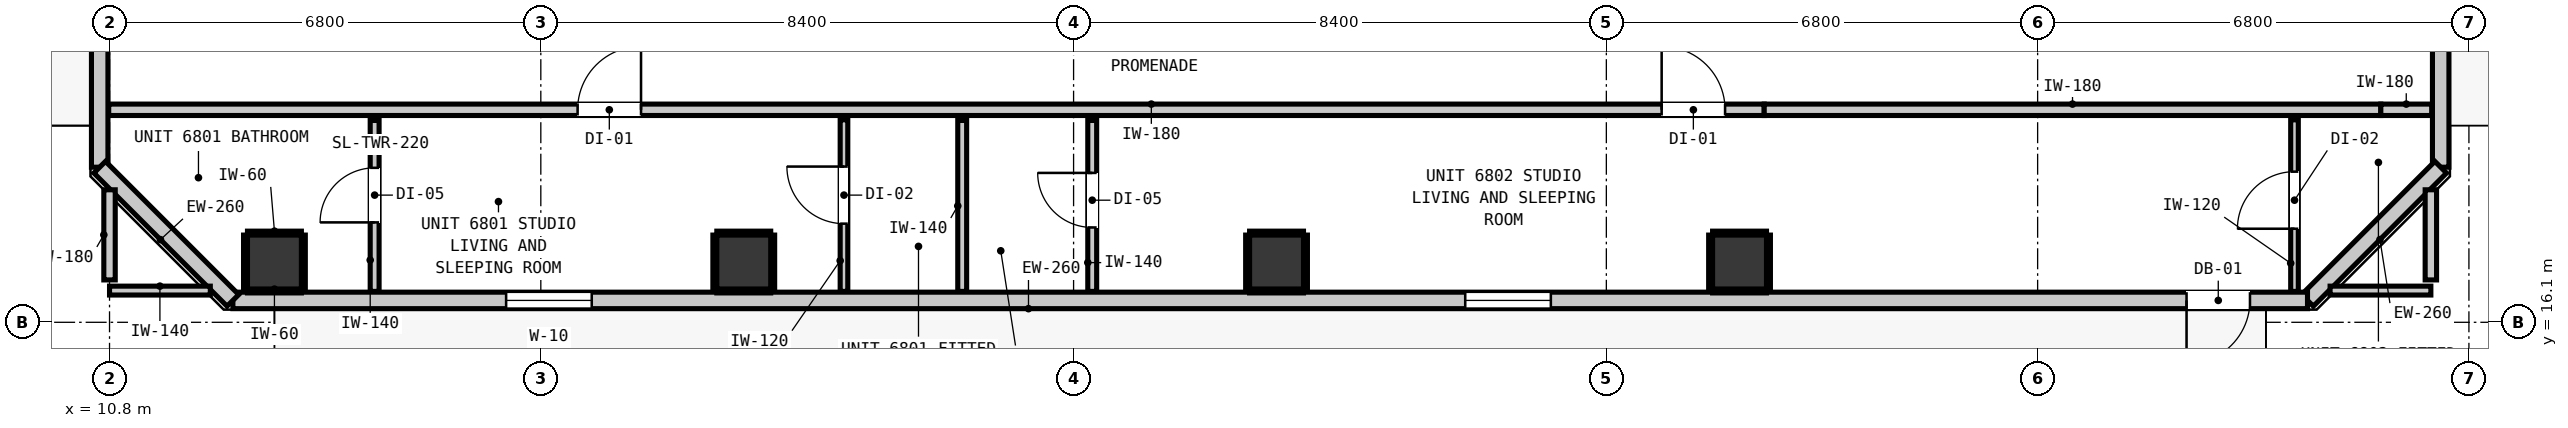
"""IFC4 building model, lengths in metres.
Left out: names, types, materials, properties, quantities, classifications, styles, units other than length and angle.
Written with IfcOpenShell. Run it as: python <this file> out.ifc"""

import sys

from ifc_helpers import new_model, si_unit, direction, frame, frame_2d, origin, origin_2d, place, context, subcontext, project, spatial, rectangle, extrude, element, fill, save


model = new_model("IFC4")
c1 = context("Model", 3, precision=1e-05, world=origin(), true_north=direction((0.0, 1.0)))
c2 = subcontext(c1, "Body", "Model", "MODEL_VIEW")
j1 = project(units=[si_unit("LENGTHUNIT", "METRE"), si_unit("PLANEANGLEUNIT", "RADIAN")], contexts=[c1])
p1 = place(None, origin())
s1 = spatial("IfcSite", under=j1, at=p1, CompositionType="ELEMENT")
p2 = place(p1, origin())
s2 = spatial("IfcBuilding", under=s1, at=p2, CompositionType="ELEMENT")
p3 = place(p2, frame((0.0, 0.0, 234.6)))
s3 = spatial("IfcBuildingStorey", under=s2, at=p3, CompositionType="ELEMENT", Elevation=234.6)
for number, where, z_axis, x_axis in (
    (1, (13.4, 17.05, 0.0), (0.0, 0.0, 1.0), (1.0, 0.0, 0.0)),
    (2, (20.8, 17.05, 0.0), (0.0, 0.0, 1.0), (1.0, 0.0, 0.0)),
    (3, (29.2, 17.05, 0.0), (0.0, 0.0, 1.0), (1.0, 0.0, 0.0)),
    (4, (36.5, 17.05, 0.0), (0.0, 0.0, 1.0), (1.0, 0.0, 0.0)),
):
    element("IfcColumn", number, at=place(p3, frame(where, z_axis=z_axis, x_axis=x_axis)), inside=s3, PredefinedType="COLUMN", context=c2, shape_type="SweptSolid", body=[
        extrude(rectangle(XDim=0.85, YDim=0.85, at=origin_2d()), origin(), (0.0, 0.0, 1.0), 3.32),
    ])
p4 = place(p3, frame((10.645, 18.545, 0.0), z_axis=(0.0, 0.0, 1.0), x_axis=(0.0, 1.0, 0.0)))
e5 = element("IfcWall", 5, at=p4, inside=s3, PredefinedType="STANDARD", context=c2, shape_type="SweptSolid", body=[
    extrude(rectangle(XDim=30.31, YDim=0.26, at=frame_2d((15.155, 0.0))), origin(), (0.0, 0.0, 1.0), 3.1),
])
p5 = place(p4, frame((27.695, 0.0, 0.0)))
e6 = element("IfcOpeningElement", 6, at=p5, cuts=e5, PredefinedType="OPENING", context=c2, shape_type="SweptSolid", body=[
    extrude(rectangle(XDim=1.0, YDim=2.15, at=frame_2d((0.5, 1.075))), frame((0.0, 0.14, 0.0), z_axis=(0.0, -1.0, 0.0), x_axis=(1.0, 0.0, 0.0)), (0.0, 0.0, 1.0), 0.28),
])
p6 = place(p4, frame((29.108, 0.0, 0.85)))
e7 = element("IfcOpeningElement", 7, at=p6, cuts=e5, PredefinedType="OPENING", context=c2, shape_type="SweptSolid", body=[
    extrude(rectangle(XDim=0.9, YDim=1.5, at=frame_2d((0.45, 0.75))), frame((0.0, 0.14, 0.0), z_axis=(0.0, -1.0, 0.0), x_axis=(1.0, 0.0, 0.0)), (0.0, 0.0, 1.0), 0.28),
])
p7 = place(p3, frame((47.555, 48.855, 0.0), z_axis=(0.0, 0.0, 1.0), x_axis=(0.0, -1.0, 0.0)))
e8 = element("IfcWall", 8, at=p7, inside=s3, PredefinedType="STANDARD", context=c2, shape_type="SweptSolid", body=[
    extrude(rectangle(XDim=30.31, YDim=0.26, at=frame_2d((15.155, 0.0))), origin(), (0.0, 0.0, 1.0), 3.1),
])
p8 = place(p7, frame((0.91, 0.0, 0.0)))
e9 = element("IfcOpeningElement", 9, at=p8, cuts=e8, PredefinedType="OPENING", context=c2, shape_type="SweptSolid", body=[
    extrude(rectangle(XDim=1.0, YDim=2.15, at=frame_2d((0.5, 1.075))), frame((0.0, 0.14, 0.0), z_axis=(0.0, -1.0, 0.0), x_axis=(1.0, 0.0, 0.0)), (0.0, 0.0, 1.0), 0.28),
])
p9 = place(p7, frame((3.782, 0.0, 0.85)))
e10 = element("IfcOpeningElement", 10, at=p9, cuts=e8, PredefinedType="OPENING", context=c2, shape_type="SweptSolid", body=[
    extrude(rectangle(XDim=1.35, YDim=1.85, at=frame_2d((0.675, 0.925))), frame((0.0, 0.14, 0.0), z_axis=(0.0, -1.0, 0.0), x_axis=(1.0, 0.0, 0.0)), (0.0, 0.0, 1.0), 0.28),
])
p10 = place(p3, frame((47.555, 18.545, 0.0), z_axis=(0.0, 0.0, 1.0), x_axis=(-0.707106781187, -0.707106781187, 0.0)))
e11 = element("IfcWall", 11, at=p10, inside=s3, PredefinedType="STANDARD", context=c2, shape_type="SweptSolid", body=[
    extrude(rectangle(XDim=2.97, YDim=0.26, at=frame_2d((1.485, 0.0))), origin(), (0.0, 0.0, 1.0), 3.1),
])
p11 = place(p3, frame((45.455, 16.445, 0.0), z_axis=(0.0, 0.0, 1.0), x_axis=(-1.0, 0.0, 0.0)))
e12 = element("IfcWall", 12, at=p11, inside=s3, PredefinedType="STANDARD", context=c2, shape_type="SweptSolid", body=[
    extrude(rectangle(XDim=32.71, YDim=0.26, at=frame_2d((16.355, 0.0))), origin(), (0.0, 0.0, 1.0), 3.1),
])
p12 = place(p11, frame((0.907, 0.0, 0.0)))
e13 = element("IfcOpeningElement", 13, at=p12, cuts=e12, PredefinedType="OPENING", context=c2, shape_type="SweptSolid", body=[
    extrude(rectangle(XDim=1.0, YDim=2.15, at=frame_2d((0.5, 1.075))), frame((0.0, 0.14, 0.0), z_axis=(0.0, -1.0, 0.0), x_axis=(1.0, 0.0, 0.0)), (0.0, 0.0, 1.0), 0.28),
])
p13 = place(p11, frame((27.052, 0.0, 0.85)))
e14 = element("IfcOpeningElement", 14, at=p13, cuts=e12, PredefinedType="OPENING", context=c2, shape_type="SweptSolid", body=[
    extrude(rectangle(XDim=1.35, YDim=1.85, at=frame_2d((0.675, 0.925))), frame((0.0, 0.14, 0.0), z_axis=(0.0, -1.0, 0.0), x_axis=(1.0, 0.0, 0.0)), (0.0, 0.0, 1.0), 0.28),
])
p14 = place(p11, frame((11.93, 0.0, 0.85)))
e15 = element("IfcOpeningElement", 15, at=p14, cuts=e12, PredefinedType="OPENING", context=c2, shape_type="SweptSolid", body=[
    extrude(rectangle(XDim=1.35, YDim=1.85, at=frame_2d((0.675, 0.925))), frame((0.0, 0.14, 0.0), z_axis=(0.0, -1.0, 0.0), x_axis=(1.0, 0.0, 0.0)), (0.0, 0.0, 1.0), 0.28),
])
p15 = place(p3, frame((12.745, 16.445, 0.0), z_axis=(0.0, 0.0, 1.0), x_axis=(-0.707147883682, 0.707065676302, 0.0)))
e16 = element("IfcWall", 16, at=p15, inside=s3, PredefinedType="STANDARD", context=c2, shape_type="SweptSolid", body=[
    extrude(rectangle(XDim=2.97, YDim=0.26, at=frame_2d((1.485, 0.0))), origin(), (0.0, 0.0, 1.0), 3.1),
])
p16 = place(p3, frame((10.787, 19.45, 0.0), z_axis=(0.0, 0.0, 1.0), x_axis=(1.0, 0.0, 0.0)))
e17 = element("IfcWall", 17, at=p16, inside=s3, PredefinedType="PARTITIONING", context=c2, shape_type="SweptSolid", body=[
    extrude(rectangle(XDim=26.102, YDim=0.18, at=frame_2d((13.051, 0.0))), origin(), (0.0, 0.0, 1.0), 3.1),
])
p17 = place(p16, frame((7.393, 0.0, 0.0)))
e18 = element("IfcOpeningElement", 18, at=p17, cuts=e17, PredefinedType="OPENING", context=c2, shape_type="SweptSolid", body=[
    extrude(rectangle(XDim=1.0, YDim=2.15, at=frame_2d((0.5, 1.075))), frame((0.0, 0.1, 0.0), z_axis=(0.0, -1.0, 0.0), x_axis=(1.0, 0.0, 0.0)), (0.0, 0.0, 1.0), 0.2),
])
p18 = place(p16, frame((24.485, 0.0, 0.0)))
e19 = element("IfcOpeningElement", 19, at=p18, cuts=e17, PredefinedType="OPENING", context=c2, shape_type="SweptSolid", body=[
    extrude(rectangle(XDim=1.0, YDim=2.15, at=frame_2d((0.5, 1.075))), frame((0.0, 0.1, 0.0), z_axis=(0.0, -1.0, 0.0), x_axis=(1.0, 0.0, 0.0)), (0.0, 0.0, 1.0), 0.2),
])
p19 = place(p3, frame((36.889, 19.45, 0.0), z_axis=(0.0, 0.0, 1.0), x_axis=(1.0, 0.0, 0.0)))
e20 = element("IfcWall", 20, at=p19, inside=s3, PredefinedType="PARTITIONING", context=c2, shape_type="SweptSolid", body=[
    extrude(rectangle(XDim=9.722, YDim=0.18, at=frame_2d((4.861, 0.0))), origin(), (0.0, 0.0, 1.0), 2.477),
])
p20 = place(p3, frame((46.611, 19.45, 0.0), z_axis=(0.0, 0.0, 1.0), x_axis=(1.0, 0.0, 0.0)))
e21 = element("IfcWall", 21, at=p20, inside=s3, PredefinedType="PARTITIONING", context=c2, shape_type="SweptSolid", body=[
    extrude(rectangle(XDim=0.802, YDim=0.18, at=frame_2d((0.401, 0.0))), origin(), (0.0, 0.0, 1.0), 3.1),
])
for number, where, z_axis, x_axis in (
    (22, (10.8, 16.6, 0.0), (0.0, 0.0, 1.0), (1.0, 0.0, 0.0)),
    (23, (45.811, 16.6, 0.0), (0.0, 0.0, 1.0), (1.0, 0.0, 0.0)),
):
    element("IfcWall", number, at=place(p3, frame(where, z_axis=z_axis, x_axis=x_axis)), inside=s3, PredefinedType="PARTITIONING", context=c2, shape_type="SweptSolid", body=[
        extrude(rectangle(XDim=1.589, YDim=0.14, at=frame_2d((0.794, 0.0))), origin(), (0.0, 0.0, 1.0), 3.1),
    ])
for number, where, z_axis, x_axis in (
    (24, (10.8, 16.768, 0.0), (0.0, 0.0, 1.0), (0.0, 1.0, 0.0)),
    (25, (47.4, 16.768, 0.0), (0.0, 0.0, 1.0), (0.0, 1.0, 0.0)),
):
    element("IfcWall", number, at=place(p3, frame(where, z_axis=z_axis, x_axis=x_axis)), inside=s3, PredefinedType="PARTITIONING", context=c2, shape_type="SweptSolid", body=[
        extrude(rectangle(XDim=1.421, YDim=0.18, at=frame_2d((0.71, 0.0))), origin(), (0.0, 0.0, 1.0), 3.1),
    ])
p21 = place(p3, frame((14.98, 16.587, 0.0), z_axis=(0.0, 0.0, 1.0), x_axis=(0.0, 1.0, 0.0)))
e26 = element("IfcWall", 26, at=p21, inside=s3, PredefinedType="PARTITIONING", context=c2, shape_type="SweptSolid", body=[
    extrude(rectangle(XDim=2.695, YDim=0.14, at=frame_2d((1.348, 0.0))), origin(), (0.0, 0.0, 1.0), 3.1),
])
p22 = place(p21, frame((1.088, 0.0, 0.0)))
e27 = element("IfcOpeningElement", 27, at=p22, cuts=e26, PredefinedType="OPENING", context=c2, shape_type="SweptSolid", body=[
    extrude(rectangle(XDim=0.86, YDim=2.02, at=frame_2d((0.43, 1.01))), frame((0.0, 0.08, 0.0), z_axis=(0.0, -1.0, 0.0), x_axis=(1.0, 0.0, 0.0)), (0.0, 0.0, 1.0), 0.16),
])
p23 = place(p3, frame((24.244, 16.587, 0.0), z_axis=(0.0, 0.0, 1.0), x_axis=(0.0, 1.0, 0.0)))
e28 = element("IfcWall", 28, at=p23, inside=s3, PredefinedType="PARTITIONING", context=c2, shape_type="SweptSolid", body=[
    extrude(rectangle(XDim=2.695, YDim=0.14, at=frame_2d((1.348, 0.0))), origin(), (0.0, 0.0, 1.0), 3.1),
])
p24 = place(p3, frame((26.294, 16.587, 0.0), z_axis=(0.0, 0.0, 1.0), x_axis=(0.0, 1.0, 0.0)))
e29 = element("IfcWall", 29, at=p24, inside=s3, PredefinedType="PARTITIONING", context=c2, shape_type="SweptSolid", body=[
    extrude(rectangle(XDim=2.695, YDim=0.14, at=frame_2d((1.348, 0.0))), origin(), (0.0, 0.0, 1.0), 3.1),
])
p25 = place(p24, frame((1.008, 0.0, 0.0)))
e30 = element("IfcOpeningElement", 30, at=p25, cuts=e29, PredefinedType="OPENING", context=c2, shape_type="SweptSolid", body=[
    extrude(rectangle(XDim=0.86, YDim=2.02, at=frame_2d((0.43, 1.01))), frame((0.0, 0.08, 0.0), z_axis=(0.0, -1.0, 0.0), x_axis=(1.0, 0.0, 0.0)), (0.0, 0.0, 1.0), 0.16),
])
p26 = place(p3, frame((22.38, 16.587, 0.0), z_axis=(0.0, 0.0, 1.0), x_axis=(0.0, 1.0, 0.0)))
e31 = element("IfcWall", 31, at=p26, inside=s3, PredefinedType="PARTITIONING", context=c2, shape_type="SweptSolid", body=[
    extrude(rectangle(XDim=2.705, YDim=0.12, at=frame_2d((1.353, 0.0))), origin(), (0.0, 0.0, 1.0), 3.1),
])
p27 = place(p26, frame((1.068, 0.0, 0.0)))
e32 = element("IfcOpeningElement", 32, at=p27, cuts=e31, PredefinedType="OPENING", context=c2, shape_type="SweptSolid", body=[
    extrude(rectangle(XDim=0.9, YDim=2.1, at=frame_2d((0.45, 1.05))), frame((0.0, 0.07, 0.0), z_axis=(0.0, -1.0, 0.0), x_axis=(1.0, 0.0, 0.0)), (0.0, 0.0, 1.0), 0.14),
])
p28 = place(p3, frame((45.25, 16.587, 0.0), z_axis=(0.0, 0.0, 1.0), x_axis=(0.0, 1.0, 0.0)))
e33 = element("IfcWall", 33, at=p28, inside=s3, PredefinedType="PARTITIONING", context=c2, shape_type="SweptSolid", body=[
    extrude(rectangle(XDim=2.705, YDim=0.12, at=frame_2d((1.353, 0.0))), origin(), (0.0, 0.0, 1.0), 3.1),
])
p29 = place(p28, frame((0.988, 0.0, 0.0)))
e34 = element("IfcOpeningElement", 34, at=p29, cuts=e33, PredefinedType="OPENING", context=c2, shape_type="SweptSolid", body=[
    extrude(rectangle(XDim=0.9, YDim=2.1, at=frame_2d((0.45, 1.05))), frame((0.0, 0.07, 0.0), z_axis=(0.0, -1.0, 0.0), x_axis=(1.0, 0.0, 0.0)), (0.0, 0.0, 1.0), 0.14),
])
for number, where, z_axis, x_axis in (
    (35, (12.975, 16.593, 0.0), (0.0, 0.0, 1.0), (1.0, 0.0, 0.0)),
    (36, (12.975, 17.507, 0.0), (0.0, 0.0, 1.0), (1.0, 0.0, 0.0)),
):
    element("IfcWall", number, at=place(p3, frame(where, z_axis=z_axis, x_axis=x_axis)), inside=s3, PredefinedType="PARTITIONING", context=c2, shape_type="SweptSolid", body=[
        extrude(rectangle(XDim=0.85, YDim=0.06, at=frame_2d((0.425, 0.0))), origin(), (0.0, 0.0, 1.0), 1.45),
    ])
for number, where, z_axis, x_axis in (
    (37, (12.943, 16.625, 0.0), (0.0, 0.0, 1.0), (0.0, 1.0, 0.0)),
    (38, (13.857, 16.625, 0.0), (0.0, 0.0, 1.0), (0.0, 1.0, 0.0)),
    (39, (20.375, 16.593, 0.0), (0.0, 0.0, 1.0), (1.0, 0.0, 0.0)),
    (40, (20.375, 17.507, 0.0), (0.0, 0.0, 1.0), (1.0, 0.0, 0.0)),
    (41, (20.343, 16.625, 0.0), (0.0, 0.0, 1.0), (0.0, 1.0, 0.0)),
    (42, (21.257, 16.625, 0.0), (0.0, 0.0, 1.0), (0.0, 1.0, 0.0)),
    (43, (28.775, 16.593, 0.0), (0.0, 0.0, 1.0), (1.0, 0.0, 0.0)),
    (44, (28.775, 17.507, 0.0), (0.0, 0.0, 1.0), (1.0, 0.0, 0.0)),
    (45, (28.743, 16.625, 0.0), (0.0, 0.0, 1.0), (0.0, 1.0, 0.0)),
    (46, (29.657, 16.625, 0.0), (0.0, 0.0, 1.0), (0.0, 1.0, 0.0)),
    (47, (36.075, 16.593, 0.0), (0.0, 0.0, 1.0), (1.0, 0.0, 0.0)),
    (48, (36.075, 17.507, 0.0), (0.0, 0.0, 1.0), (1.0, 0.0, 0.0)),
    (49, (36.043, 16.625, 0.0), (0.0, 0.0, 1.0), (0.0, 1.0, 0.0)),
    (50, (36.957, 16.625, 0.0), (0.0, 0.0, 1.0), (0.0, 1.0, 0.0)),
):
    element("IfcWall", number, at=place(p3, frame(where, z_axis=z_axis, x_axis=x_axis)), inside=s3, PredefinedType="PARTITIONING", context=c2, shape_type="SweptSolid", body=[
        extrude(rectangle(XDim=0.85, YDim=0.06, at=frame_2d((0.425, 0.0))), origin(), (0.0, 0.0, 1.0), 1.45),
    ])
p30 = place(p12, origin())
e51 = element("IfcDoor", 51, at=p30, inside=s3, OperationType="SINGLE_SWING_RIGHT", PredefinedType="DOOR", context=c2, shape_type="SweptSolid", body=[
    extrude(rectangle(XDim=1.0, YDim=2.15, at=frame_2d((0.5, 1.075))), frame((0.0, 0.025, 0.0), z_axis=(0.0, -1.0, 0.0), x_axis=(1.0, 0.0, 0.0)), (0.0, 0.0, 1.0), 0.05),
])
fill(e13, e51)
p31 = place(p13, origin())
e52 = element("IfcWindow", 52, at=p31, inside=s3, PartitioningType="SINGLE_PANEL", PredefinedType="WINDOW", context=c2, shape_type="SweptSolid", body=[
    extrude(rectangle(XDim=1.35, YDim=1.85, at=frame_2d((0.675, 0.925))), frame((0.0, 0.03, 0.0), z_axis=(0.0, -1.0, 0.0), x_axis=(1.0, 0.0, 0.0)), (0.0, 0.0, 1.0), 0.06),
])
fill(e14, e52)
p32 = place(p14, origin())
e53 = element("IfcWindow", 53, at=p32, inside=s3, PartitioningType="SINGLE_PANEL", PredefinedType="WINDOW", context=c2, shape_type="SweptSolid", body=[
    extrude(rectangle(XDim=1.35, YDim=1.85, at=frame_2d((0.675, 0.925))), frame((0.0, 0.03, 0.0), z_axis=(0.0, -1.0, 0.0), x_axis=(1.0, 0.0, 0.0)), (0.0, 0.0, 1.0), 0.06),
])
fill(e15, e53)
p33 = place(p17, origin())
e54 = element("IfcDoor", 54, at=p33, inside=s3, OperationType="SINGLE_SWING_RIGHT", PredefinedType="DOOR", context=c2, shape_type="SweptSolid", body=[
    extrude(rectangle(XDim=1.0, YDim=2.15, at=frame_2d((0.5, 1.075))), frame((0.0, 0.025, 0.0), z_axis=(0.0, -1.0, 0.0), x_axis=(1.0, 0.0, 0.0)), (0.0, 0.0, 1.0), 0.05),
])
fill(e18, e54)
p34 = place(p22, origin())
e55 = element("IfcDoor", 55, at=p34, inside=s3, OperationType="SINGLE_SWING_LEFT", PredefinedType="DOOR", context=c2, shape_type="SweptSolid", body=[
    extrude(rectangle(XDim=0.86, YDim=2.02, at=frame_2d((0.43, 1.01))), frame((0.0, 0.025, 0.0), z_axis=(0.0, -1.0, 0.0), x_axis=(1.0, 0.0, 0.0)), (0.0, 0.0, 1.0), 0.05),
])
fill(e27, e55)
p35 = place(p27, origin())
e56 = element("IfcDoor", 56, at=p35, inside=s3, OperationType="SINGLE_SWING_RIGHT", PredefinedType="DOOR", context=c2, shape_type="SweptSolid", body=[
    extrude(rectangle(XDim=0.9, YDim=2.1, at=frame_2d((0.45, 1.05))), frame((0.0, 0.025, 0.0), z_axis=(0.0, -1.0, 0.0), x_axis=(1.0, 0.0, 0.0)), (0.0, 0.0, 1.0), 0.05),
])
fill(e32, e56)
p36 = place(p18, origin())
e57 = element("IfcDoor", 57, at=p36, inside=s3, OperationType="SINGLE_SWING_LEFT", PredefinedType="DOOR", context=c2, shape_type="SweptSolid", body=[
    extrude(rectangle(XDim=1.0, YDim=2.15, at=frame_2d((0.5, 1.075))), frame((0.0, 0.025, 0.0), z_axis=(0.0, -1.0, 0.0), x_axis=(1.0, 0.0, 0.0)), (0.0, 0.0, 1.0), 0.05),
])
fill(e19, e57)
p37 = place(p25, origin())
e58 = element("IfcDoor", 58, at=p37, inside=s3, OperationType="SINGLE_SWING_RIGHT", PredefinedType="DOOR", context=c2, shape_type="SweptSolid", body=[
    extrude(rectangle(XDim=0.86, YDim=2.02, at=frame_2d((0.43, 1.01))), frame((0.0, 0.025, 0.0), z_axis=(0.0, -1.0, 0.0), x_axis=(1.0, 0.0, 0.0)), (0.0, 0.0, 1.0), 0.05),
])
fill(e30, e58)
p38 = place(p29, origin())
e59 = element("IfcDoor", 59, at=p38, inside=s3, OperationType="SINGLE_SWING_LEFT", PredefinedType="DOOR", context=c2, shape_type="SweptSolid", body=[
    extrude(rectangle(XDim=0.9, YDim=2.1, at=frame_2d((0.45, 1.05))), frame((0.0, 0.025, 0.0), z_axis=(0.0, -1.0, 0.0), x_axis=(1.0, 0.0, 0.0)), (0.0, 0.0, 1.0), 0.05),
])
fill(e34, e59)
save(model, sys.argv[1])
